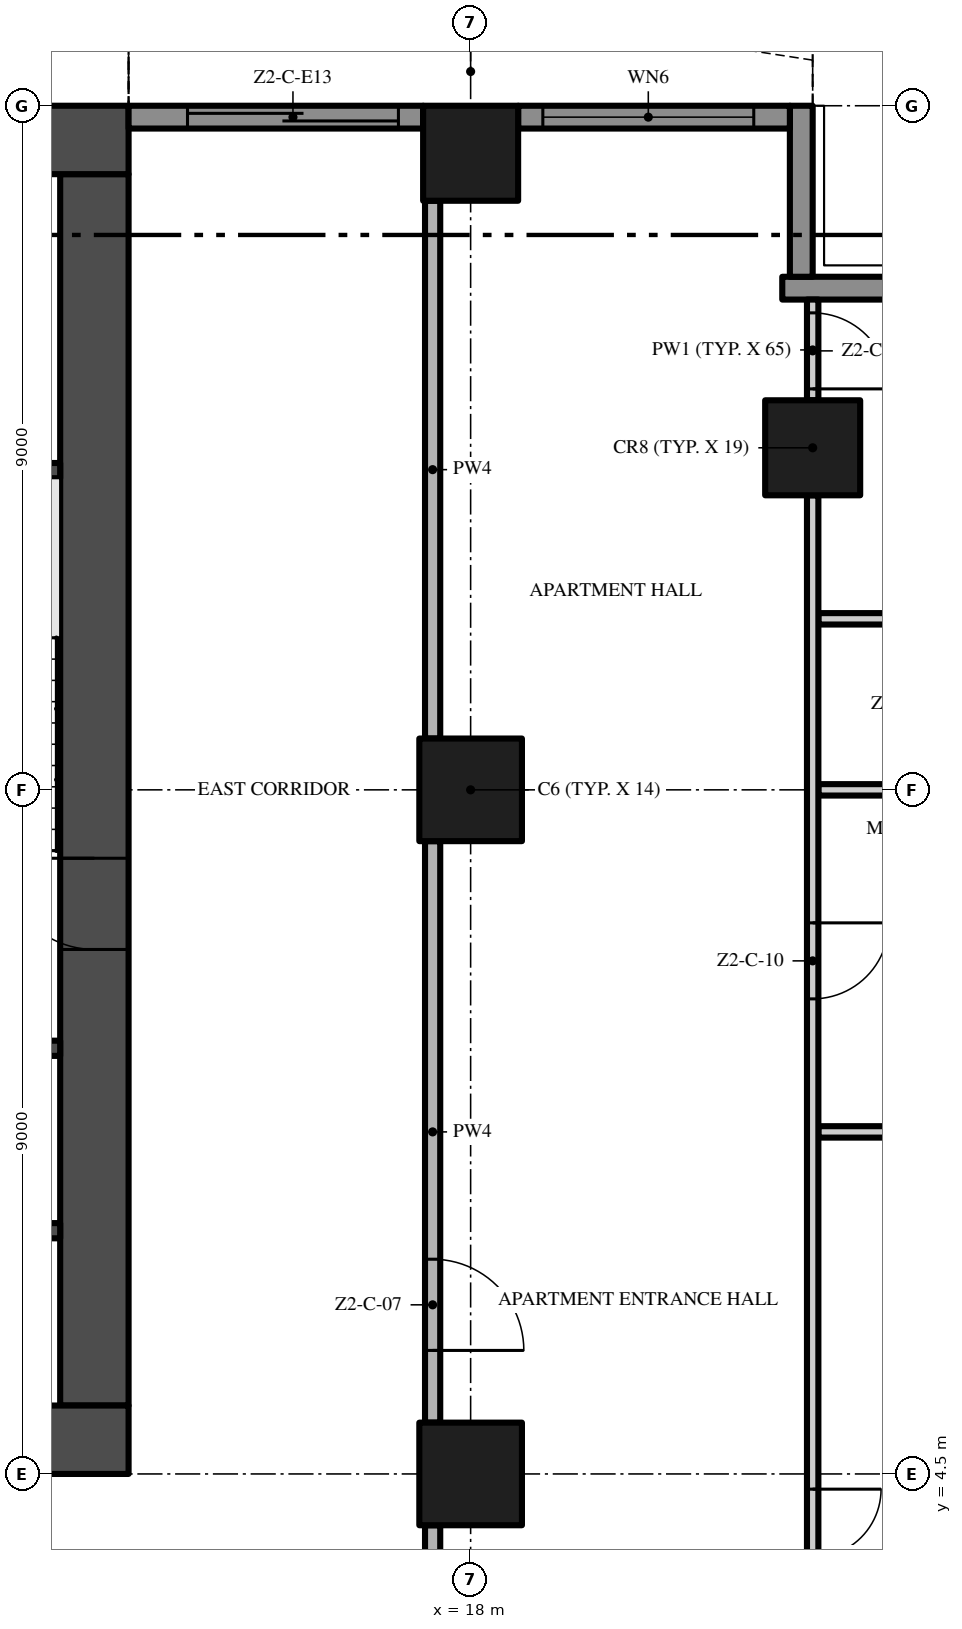
"""IFC4 building model, lengths in metres.
Left out: names, types, materials, properties, quantities, classifications, styles, units other than length and angle.
Written with IfcOpenShell. Run it as: python <this file> out.ifc"""

import sys

from ifc_helpers import new_model, si_unit, direction, frame, frame_2d, origin, origin_2d, place, context, subcontext, project, spatial, polyline, rectangle, outline, extrude, element, fill, save


model = new_model("IFC4")
c1 = context("Model", 3, precision=1e-05, world=origin(), true_north=direction((0.0, 1.0)))
c2 = subcontext(c1, "Body", "Model", "MODEL_VIEW")
j1 = project(units=[si_unit("LENGTHUNIT", "METRE"), si_unit("PLANEANGLEUNIT", "RADIAN")], contexts=[c1])
p1 = place(None, origin())
s1 = spatial("IfcSite", under=j1, at=p1, CompositionType="ELEMENT")
p2 = place(p1, origin())
s2 = spatial("IfcBuilding", under=s1, at=p2, CompositionType="ELEMENT")
p3 = place(p2, frame((0.0, 0.0, 99.8)))
s3 = spatial("IfcBuildingStorey", under=s2, at=p3, CompositionType="ELEMENT", Elevation=99.8)
p4 = place(p3, frame((-13.5, 4.95, -0.3), z_axis=(0.0, 0.0, 1.0), x_axis=(1.0, 0.0, 0.0)))
e1 = element("IfcWall", 1, at=p4, inside=s3, PredefinedType="SHEAR", context=c2, shape_type="SweptSolid", body=[
    extrude(rectangle(XDim=27.0, YDim=0.9, at=frame_2d((13.5, 0.0))), origin(), (0.0, 0.0, 1.0), 3.8),
])
p5 = place(p4, frame((12.0, 0.0, 0.3)))
e2 = element("IfcOpeningElement", 2, at=p5, cuts=e1, PredefinedType="OPENING", context=c2, shape_type="SweptSolid", body=[
    extrude(rectangle(XDim=3.0, YDim=2.4, at=frame_2d((1.5, 1.2))), frame((0.0, 0.46, 0.0), z_axis=(0.0, -1.0, 0.0), x_axis=(1.0, 0.0, 0.0)), (0.0, 0.0, 1.0), 0.92),
])
p6 = place(p4, frame((4.9, 0.0, 0.3)))
e3 = element("IfcOpeningElement", 3, at=p6, cuts=e1, PredefinedType="OPENING", context=c2, shape_type="SweptSolid", body=[
    extrude(rectangle(XDim=1.2, YDim=2.2, at=frame_2d((0.6, 1.1))), frame((0.0, 0.46, 0.0), z_axis=(0.0, -1.0, 0.0), x_axis=(1.0, 0.0, 0.0)), (0.0, 0.0, 1.0), 0.92),
])
p7 = place(p4, frame((20.75, 0.0, 0.3)))
e4 = element("IfcOpeningElement", 4, at=p7, cuts=e1, PredefinedType="OPENING", context=c2, shape_type="SweptSolid", body=[
    extrude(rectangle(XDim=1.5, YDim=2.2, at=frame_2d((0.75, 1.1))), frame((0.0, 0.46, 0.0), z_axis=(0.0, -1.0, 0.0), x_axis=(1.0, 0.0, 0.0)), (0.0, 0.0, 1.0), 0.92),
])
p8 = place(p4, frame((17.4, 0.0, 0.3)))
e5 = element("IfcOpeningElement", 5, at=p8, cuts=e1, PredefinedType="OPENING", context=c2, shape_type="SweptSolid", body=[
    extrude(rectangle(XDim=1.2, YDim=2.2, at=frame_2d((0.6, 1.1))), frame((0.0, 0.46, 0.0), z_axis=(0.0, -1.0, 0.0), x_axis=(1.0, 0.0, 0.0)), (0.0, 0.0, 1.0), 0.92),
])
p9 = place(p3, frame((13.05, 5.4, -0.3), z_axis=(0.0, 0.0, 1.0), x_axis=(0.0, 1.0, 0.0)))
e6 = element("IfcWall", 6, at=p9, inside=s3, PredefinedType="SHEAR", context=c2, shape_type="SweptSolid", body=[
    extrude(rectangle(XDim=16.2, YDim=0.9, at=frame_2d((8.1, 0.0))), origin(), (0.0, 0.0, 1.0), 3.8),
])
p10 = place(p9, frame((6.0, 0.0, 0.3)))
e7 = element("IfcOpeningElement", 7, at=p10, cuts=e6, PredefinedType="OPENING", context=c2, shape_type="SweptSolid", body=[
    extrude(rectangle(XDim=1.2, YDim=2.2, at=frame_2d((0.6, 1.1))), frame((0.0, 0.46, 0.0), z_axis=(0.0, -1.0, 0.0), x_axis=(1.0, 0.0, 0.0)), (0.0, 0.0, 1.0), 0.92),
])
p11 = place(p3, frame((13.5, 22.05, -0.3), z_axis=(0.0, 0.0, 1.0), x_axis=(-1.0, 0.0, 0.0)))
e8 = element("IfcWall", 8, at=p11, inside=s3, PredefinedType="SHEAR", context=c2, shape_type="SweptSolid", body=[
    extrude(rectangle(XDim=27.0, YDim=0.9, at=frame_2d((13.5, 0.0))), origin(), (0.0, 0.0, 1.0), 3.8),
])
p12 = place(p3, frame((18.0, 13.5, 0.0), z_axis=(0.0, 0.0, 1.0), x_axis=(1.0, 0.0, 0.0)))
e9 = element("IfcColumn", 9, at=p12, inside=s3, PredefinedType="COLUMN", context=c2, shape_type="SweptSolid", body=[
    extrude(rectangle(XDim=1.35, YDim=1.35, at=origin_2d()), origin(), (0.0, 0.0, 1.0), 3.5),
])
p13 = place(p3, frame((18.0, 21.875, 0.0), z_axis=(0.0, 0.0, 1.0), x_axis=(1.0, 0.0, 0.0)))
e10 = element("IfcColumn", 10, at=p13, inside=s3, PredefinedType="COLUMN", context=c2, shape_type="SweptSolid", body=[
    extrude(rectangle(XDim=1.25, YDim=1.25, at=origin_2d()), origin(), (0.0, 0.0, 1.0), 3.5),
])
p14 = place(p3, frame((18.0, 4.5, 0.0), z_axis=(0.0, 0.0, 1.0), x_axis=(1.0, 0.0, 0.0)))
e11 = element("IfcColumn", 11, at=p14, inside=s3, PredefinedType="COLUMN", context=c2, shape_type="SweptSolid", body=[
    extrude(rectangle(XDim=1.35, YDim=1.35, at=origin_2d()), origin(), (0.0, 0.0, 1.0), 3.5),
])
p15 = place(p3, frame((22.5, 18.0, 0.0), z_axis=(0.0, 0.0, 1.0), x_axis=(1.0, 0.0, 0.0)))
e12 = element("IfcColumn", 12, at=p15, inside=s3, PredefinedType="COLUMN", context=c2, shape_type="SweptSolid", body=[
    extrude(rectangle(XDim=1.25, YDim=1.25, at=origin_2d()), origin(), (0.0, 0.0, 1.0), 3.5),
])
p16 = place(p3, frame((22.1, 20.1, 0.0), z_axis=(0.0, 0.0, 1.0), x_axis=(1.0, 0.0, 0.0)))
e13 = element("IfcWall", 13, at=p16, inside=s3, PredefinedType="SOLIDWALL", context=c2, shape_type="SweptSolid", body=[
    extrude(rectangle(XDim=2.35, YDim=0.3, at=frame_2d((1.175, 0.0))), origin(), (0.0, 0.0, 1.0), 3.5),
])
p17 = place(p3, frame((22.35, 22.5, 0.0), z_axis=(0.0, 0.0, 1.0), x_axis=(0.0, -1.0, 0.0)))
e14 = element("IfcWall", 14, at=p17, inside=s3, PredefinedType="SOLIDWALL", context=c2, shape_type="SweptSolid", body=[
    extrude(rectangle(XDim=2.25, YDim=0.3, at=frame_2d((1.125, 0.0))), origin(), (0.0, 0.0, 1.0), 3.5),
])
p18 = place(p3, frame((18.625, 22.35, 0.0), z_axis=(0.0, 0.0, 1.0), x_axis=(1.0, 0.0, 0.0)))
e15 = element("IfcWall", 15, at=p18, inside=s3, PredefinedType="SOLIDWALL", context=c2, shape_type="SweptSolid", body=[
    extrude(rectangle(XDim=3.575, YDim=0.3, at=frame_2d((1.788, 0.0))), origin(), (0.0, 0.0, 1.0), 3.5),
])
p19 = place(p18, frame((0.325, 0.0, 0.45)))
e16 = element("IfcOpeningElement", 16, at=p19, cuts=e15, PredefinedType="OPENING", context=c2, shape_type="SweptSolid", body=[
    extrude(rectangle(XDim=2.775, YDim=2.65, at=frame_2d((1.387, 1.325))), frame((0.0, 0.16, 0.0), z_axis=(0.0, -1.0, 0.0), x_axis=(1.0, 0.0, 0.0)), (0.0, 0.0, 1.0), 0.32),
])
p20 = place(p3, frame((13.5, 22.35, 0.0), z_axis=(0.0, 0.0, 1.0), x_axis=(1.0, 0.0, 0.0)))
e17 = element("IfcWall", 17, at=p20, inside=s3, PredefinedType="SOLIDWALL", context=c2, shape_type="SweptSolid", body=[
    extrude(rectangle(XDim=3.875, YDim=0.3, at=frame_2d((1.938, 0.0))), origin(), (0.0, 0.0, 1.0), 3.5),
])
p21 = place(p20, frame((0.775, 0.0, 0.0)))
e18 = element("IfcOpeningElement", 18, at=p21, cuts=e17, PredefinedType="OPENING", context=c2, shape_type="SweptSolid", body=[
    extrude(rectangle(XDim=2.775, YDim=2.4, at=frame_2d((1.387, 1.2))), frame((0.0, 0.16, 0.0), z_axis=(0.0, -1.0, 0.0), x_axis=(1.0, 0.0, 0.0)), (0.0, 0.0, 1.0), 0.32),
])
p22 = place(p3, origin())
e19 = element("IfcWall", 19, at=p22, inside=s3, PredefinedType="USERDEFINED", context=c2, shape_type="SweptSolid", body=[
    extrude(outline(polyline([(22.5, 23.1), (21.0, 23.329), (19.5, 23.929), (18.0, 24.671), (16.5, 25.271), (15.0, 25.5), (13.5, 25.271), (13.538, 25.024), (15.0, 25.247), (16.434, 25.028), (17.898, 24.442), (19.398, 23.701), (20.934, 23.086), (22.462, 22.853), (22.5, 23.1)])), origin(), (0.0, 0.0, 1.0), 0.9),
])
for number, where, z_axis, x_axis in (
    (20, (9.65, 7.7, 0.0), (0.0, 0.0, 1.0), (1.0, 0.0, 0.0)),
    (21, (9.65, 10.1, 0.0), (0.0, 0.0, 1.0), (1.0, 0.0, 0.0)),
    (22, (9.65, 17.7, 0.0), (0.0, 0.0, 1.0), (1.0, 0.0, 0.0)),
):
    element("IfcWall", number, at=place(p3, frame(where, z_axis=z_axis, x_axis=x_axis)), inside=s3, PredefinedType="SHEAR", context=c2, shape_type="SweptSolid", body=[
        extrude(rectangle(XDim=2.95, YDim=0.2, at=frame_2d((1.475, 0.0))), origin(), (0.0, 0.0, 1.0), 3.5),
    ])
p23 = place(p3, frame((22.575, 9.0, 0.0), z_axis=(0.0, 0.0, 1.0), x_axis=(1.0, 0.0, 0.0)))
e23 = element("IfcWall", 23, at=p23, inside=s3, PredefinedType="PARTITIONING", context=c2, shape_type="SweptSolid", body=[
    extrude(rectangle(XDim=4.125, YDim=0.15, at=frame_2d((2.062, 0.0))), origin(), (0.0, 0.0, 1.0), 3.5),
])
p24 = place(p3, frame((22.575, 13.5, 0.0), z_axis=(0.0, 0.0, 1.0), x_axis=(1.0, 0.0, 0.0)))
e24 = element("IfcWall", 24, at=p24, inside=s3, PredefinedType="PARTITIONING", context=c2, shape_type="SweptSolid", body=[
    extrude(rectangle(XDim=3.175, YDim=0.15, at=frame_2d((1.587, 0.0))), origin(), (0.0, 0.0, 1.0), 3.5),
])
p25 = place(p3, frame((22.575, 15.75, 0.0), z_axis=(0.0, 0.0, 1.0), x_axis=(1.0, 0.0, 0.0)))
e25 = element("IfcWall", 25, at=p25, inside=s3, PredefinedType="PARTITIONING", context=c2, shape_type="SweptSolid", body=[
    extrude(rectangle(XDim=1.875, YDim=0.15, at=frame_2d((0.938, 0.0))), origin(), (0.0, 0.0, 1.0), 3.5),
])
p26 = place(p3, frame((17.5, -0.2, 0.0), z_axis=(0.0, 0.0, 1.0), x_axis=(0.0, 1.0, 0.0)))
e26 = element("IfcWall", 26, at=p26, inside=s3, PredefinedType="PARTITIONING", context=c2, shape_type="SweptSolid", body=[
    extrude(rectangle(XDim=4.025, YDim=0.2, at=frame_2d((2.013, 0.0))), origin(), (0.0, 0.0, 1.0), 3.5),
])
p27 = place(p3, frame((17.5, 12.825, 0.0), z_axis=(0.0, 0.0, 1.0), x_axis=(0.0, -1.0, 0.0)))
e27 = element("IfcWall", 27, at=p27, inside=s3, PredefinedType="PARTITIONING", context=c2, shape_type="SweptSolid", body=[
    extrude(rectangle(XDim=7.65, YDim=0.2, at=frame_2d((3.825, 0.0))), origin(), (0.0, 0.0, 1.0), 3.5),
])
p28 = place(p27, frame((5.5, 0.0, 0.0)))
e28 = element("IfcOpeningElement", 28, at=p28, cuts=e27, PredefinedType="OPENING", context=c2, shape_type="SweptSolid", body=[
    extrude(rectangle(XDim=1.2, YDim=2.4, at=frame_2d((0.6, 1.2))), frame((0.0, 0.11, 0.0), z_axis=(0.0, -1.0, 0.0), x_axis=(1.0, 0.0, 0.0)), (0.0, 0.0, 1.0), 0.22),
])
p29 = place(p3, frame((17.5, 14.175, 0.0), z_axis=(0.0, 0.0, 1.0), x_axis=(0.0, 1.0, 0.0)))
e29 = element("IfcWall", 29, at=p29, inside=s3, PredefinedType="PARTITIONING", context=c2, shape_type="SweptSolid", body=[
    extrude(rectangle(XDim=7.075, YDim=0.2, at=frame_2d((3.538, 0.0))), origin(), (0.0, 0.0, 1.0), 3.5),
])
p30 = place(p3, frame((22.5, 17.375, 0.0), z_axis=(0.0, 0.0, 1.0), x_axis=(0.0, -1.0, 0.0)))
e30 = element("IfcWall", 30, at=p30, inside=s3, PredefinedType="PARTITIONING", context=c2, shape_type="SweptSolid", body=[
    extrude(rectangle(XDim=17.275, YDim=0.15, at=frame_2d((8.637, 0.0))), origin(), (0.0, 0.0, 1.0), 3.5),
])
p31 = place(p30, frame((13.075, 0.0, 0.0)))
e31 = element("IfcOpeningElement", 31, at=p31, cuts=e30, PredefinedType="OPENING", context=c2, shape_type="SweptSolid", body=[
    extrude(rectangle(XDim=1.8, YDim=2.4, at=frame_2d((0.9, 1.2))), frame((0.0, 0.085, 0.0), z_axis=(0.0, -1.0, 0.0), x_axis=(1.0, 0.0, 0.0)), (0.0, 0.0, 1.0), 0.17),
])
p32 = place(p30, frame((5.625, 0.0, 0.0)))
e32 = element("IfcOpeningElement", 32, at=p32, cuts=e30, PredefinedType="OPENING", context=c2, shape_type="SweptSolid", body=[
    extrude(rectangle(XDim=1.0, YDim=2.4, at=frame_2d((0.5, 1.2))), frame((0.0, 0.085, 0.0), z_axis=(0.0, -1.0, 0.0), x_axis=(1.0, 0.0, 0.0)), (0.0, 0.0, 1.0), 0.17),
])
p33 = place(p3, frame((22.5, 19.95, 0.0), z_axis=(0.0, 0.0, 1.0), x_axis=(0.0, -1.0, 0.0)))
e33 = element("IfcWall", 33, at=p33, inside=s3, PredefinedType="PARTITIONING", context=c2, shape_type="SweptSolid", body=[
    extrude(rectangle(XDim=1.325, YDim=0.15, at=frame_2d((0.662, 0.0))), origin(), (0.0, 0.0, 1.0), 3.5),
])
p34 = place(p33, frame((0.175, 0.0, 0.0)))
e34 = element("IfcOpeningElement", 34, at=p34, cuts=e33, PredefinedType="OPENING", context=c2, shape_type="SweptSolid", body=[
    extrude(rectangle(XDim=1.0, YDim=2.4, at=frame_2d((0.5, 1.2))), frame((0.0, 0.085, 0.0), z_axis=(0.0, -1.0, 0.0), x_axis=(1.0, 0.0, 0.0)), (0.0, 0.0, 1.0), 0.17),
])
p35 = place(p19, origin())
e35 = element("IfcWindow", 35, at=p35, inside=s3, PartitioningType="SINGLE_PANEL", PredefinedType="WINDOW", context=c2, shape_type="SweptSolid", body=[
    extrude(rectangle(XDim=2.775, YDim=2.65, at=frame_2d((1.387, 1.325))), frame((0.0, 0.03, 0.0), z_axis=(0.0, -1.0, 0.0), x_axis=(1.0, 0.0, 0.0)), (0.0, 0.0, 1.0), 0.06),
])
fill(e16, e35)
p36 = place(p21, origin())
e36 = element("IfcDoor", 36, at=p36, inside=s3, OperationType="SINGLE_SWING_LEFT", PredefinedType="DOOR", context=c2, shape_type="SweptSolid", body=[
    extrude(rectangle(XDim=2.775, YDim=2.4, at=frame_2d((1.387, 1.2))), frame((0.0, 0.025, 0.0), z_axis=(0.0, -1.0, 0.0), x_axis=(1.0, 0.0, 0.0)), (0.0, 0.0, 1.0), 0.05),
])
fill(e18, e36)
p37 = place(p10, frame((1.2, 0.0, 0.0), z_axis=(0.0, 0.0, 1.0), x_axis=(-1.0, 0.0, 0.0)))
e37 = element("IfcDoor", 37, at=p37, inside=s3, OperationType="SINGLE_SWING_LEFT", PredefinedType="DOOR", context=c2, shape_type="SweptSolid", body=[
    extrude(rectangle(XDim=1.2, YDim=2.2, at=frame_2d((0.6, 1.1))), frame((0.0, 0.025, 0.0), z_axis=(0.0, -1.0, 0.0), x_axis=(1.0, 0.0, 0.0)), (0.0, 0.0, 1.0), 0.05),
])
fill(e7, e37)
p38 = place(p28, origin())
e38 = element("IfcDoor", 38, at=p38, inside=s3, OperationType="SINGLE_SWING_RIGHT", PredefinedType="DOOR", context=c2, shape_type="SweptSolid", body=[
    extrude(rectangle(XDim=1.2, YDim=2.4, at=frame_2d((0.6, 1.2))), frame((0.0, 0.025, 0.0), z_axis=(0.0, -1.0, 0.0), x_axis=(1.0, 0.0, 0.0)), (0.0, 0.0, 1.0), 0.05),
])
fill(e28, e38)
p39 = place(p31, origin())
e39 = element("IfcDoor", 39, at=p39, inside=s3, OperationType="DOUBLE_DOOR_SINGLE_SWING", PredefinedType="DOOR", context=c2, shape_type="SweptSolid", body=[
    extrude(rectangle(XDim=1.8, YDim=2.4, at=frame_2d((0.9, 1.2))), frame((0.0, 0.025, 0.0), z_axis=(0.0, -1.0, 0.0), x_axis=(1.0, 0.0, 0.0)), (0.0, 0.0, 1.0), 0.05),
])
fill(e31, e39)
p40 = place(p32, origin())
e40 = element("IfcDoor", 40, at=p40, inside=s3, OperationType="SINGLE_SWING_LEFT", PredefinedType="DOOR", context=c2, shape_type="SweptSolid", body=[
    extrude(rectangle(XDim=1.0, YDim=2.4, at=frame_2d((0.5, 1.2))), frame((0.0, 0.025, 0.0), z_axis=(0.0, -1.0, 0.0), x_axis=(1.0, 0.0, 0.0)), (0.0, 0.0, 1.0), 0.05),
])
fill(e32, e40)
p41 = place(p34, origin())
e41 = element("IfcDoor", 41, at=p41, inside=s3, OperationType="SINGLE_SWING_RIGHT", PredefinedType="DOOR", context=c2, shape_type="SweptSolid", body=[
    extrude(rectangle(XDim=1.0, YDim=2.4, at=frame_2d((0.5, 1.2))), frame((0.0, 0.025, 0.0), z_axis=(0.0, -1.0, 0.0), x_axis=(1.0, 0.0, 0.0)), (0.0, 0.0, 1.0), 0.05),
])
fill(e34, e41)
save(model, sys.argv[1])
